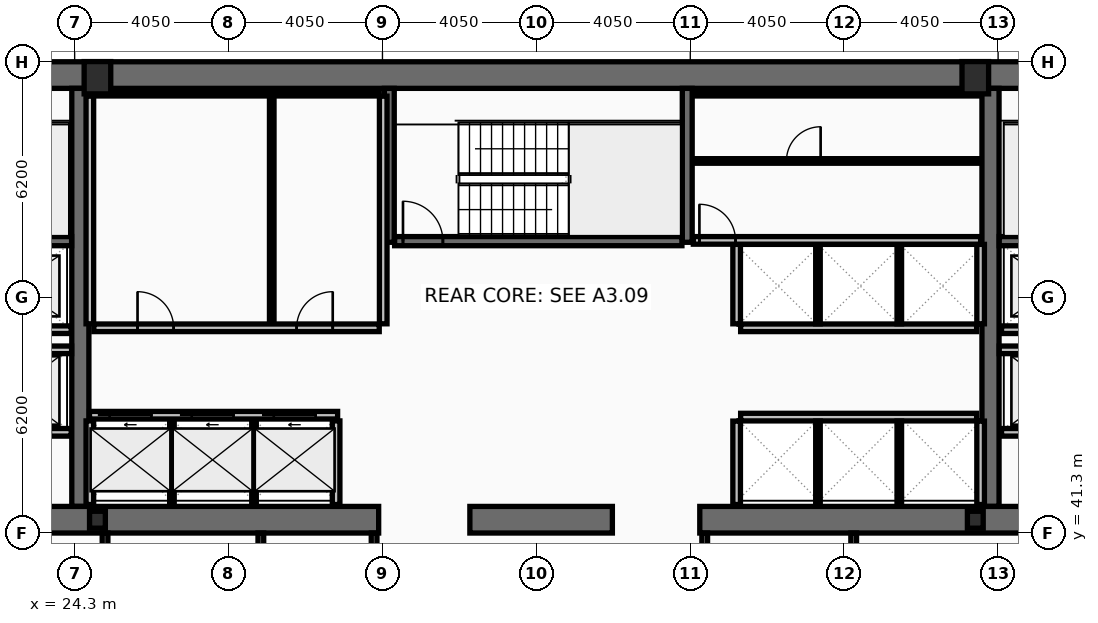
"""IFC4 building model, lengths in metres.
Left out: names, types, materials, properties, quantities, classifications, styles, units other than length and angle.
Written with IfcOpenShell. Run it as: python <this file> out.ifc"""

import sys

from ifc_helpers import new_model, si_unit, direction, frame, frame_2d, origin, origin_2d, place, context, subcontext, project, spatial, rectangle, hollow_rectangle, i_section, extrude, element, fill, save


model = new_model("IFC4")
c1 = context("Model", 3, precision=1e-05, world=origin(), true_north=direction((0.0, 1.0)))
c2 = subcontext(c1, "Body", "Model", "MODEL_VIEW")
j1 = project(units=[si_unit("LENGTHUNIT", "METRE"), si_unit("PLANEANGLEUNIT", "RADIAN")], contexts=[c1])
p1 = place(None, origin())
s1 = spatial("IfcSite", under=j1, at=p1, CompositionType="ELEMENT")
p2 = place(p1, origin())
s2 = spatial("IfcBuilding", under=s1, at=p2, CompositionType="ELEMENT")
p3 = place(p2, frame((0.0, 0.0, 114.6)))
s3 = spatial("IfcBuildingStorey", under=s2, at=p3, CompositionType="ELEMENT", Elevation=114.6)
p4 = place(p3, frame((16.2, 53.35, 0.0), z_axis=(0.0, 0.0, 1.0), x_axis=(1.0, 0.0, 0.0)))
e1 = element("IfcWall", 1, at=p4, inside=s3, PredefinedType="SHEAR", context=c2, shape_type="SweptSolid", body=[
    extrude(rectangle(XDim=40.5, YDim=0.7, at=frame_2d((20.25, 0.0))), origin(), (0.0, 0.0, 1.0), 3.44),
])
for number, where, z_axis, x_axis in (
    (2, (24.45, 42.0, 0.0), (0.0, 0.0, 1.0), (0.0, 1.0, 0.0)),
    (3, (48.4, 42.0, 0.0), (0.0, 0.0, 1.0), (0.0, 1.0, 0.0)),
):
    element("IfcWall", number, at=place(p3, frame(where, z_axis=z_axis, x_axis=x_axis)), inside=s3, PredefinedType="SHEAR", context=c2, shape_type="SweptSolid", body=[
        extrude(rectangle(XDim=11.0, YDim=0.45, at=frame_2d((5.5, 0.0))), origin(), (0.0, 0.0, 1.0), 3.44),
    ])
p5 = place(p3, frame((32.3, 41.65, 0.0), z_axis=(0.0, 0.0, 1.0), x_axis=(-1.0, 0.0, 0.0)))
e4 = element("IfcWall", 4, at=p5, inside=s3, PredefinedType="SHEAR", context=c2, shape_type="SweptSolid", body=[
    extrude(rectangle(XDim=11.45, YDim=0.7, at=frame_2d((5.725, 0.0))), origin(), (0.0, 0.0, 1.0), 3.44),
])
p6 = place(p3, frame((38.45, 41.65, 0.0), z_axis=(0.0, 0.0, 1.0), x_axis=(-1.0, 0.0, 0.0)))
e5 = element("IfcWall", 5, at=p6, inside=s3, PredefinedType="SHEAR", context=c2, shape_type="SweptSolid", body=[
    extrude(rectangle(XDim=3.75, YDim=0.7, at=frame_2d((1.875, 0.0))), origin(), (0.0, 0.0, 1.0), 3.44),
])
p7 = place(p3, frame((52.05, 41.65, 0.0), z_axis=(0.0, 0.0, 1.0), x_axis=(-1.0, 0.0, 0.0)))
e6 = element("IfcWall", 6, at=p7, inside=s3, PredefinedType="SHEAR", context=c2, shape_type="SweptSolid", body=[
    extrude(rectangle(XDim=11.3, YDim=0.7, at=frame_2d((5.65, 0.0))), origin(), (0.0, 0.0, 1.0), 3.44),
])
for number, where, z_axis, x_axis in (
    (7, (32.58, 48.95, 0.0), (0.0, 0.0, 1.0), (0.0, 1.0, 0.0)),
    (8, (40.42, 48.95, 0.0), (0.0, 0.0, 1.0), (0.0, 1.0, 0.0)),
):
    element("IfcWall", number, at=place(p3, frame(where, z_axis=z_axis, x_axis=x_axis)), inside=s3, PredefinedType="SHEAR", context=c2, shape_type="SweptSolid", body=[
        extrude(rectangle(XDim=4.05, YDim=0.26, at=frame_2d((2.025, 0.0))), origin(), (0.0, 0.0, 1.0), 3.44),
    ])
p8 = place(p3, frame((16.9, 48.98, 0.0), z_axis=(0.0, 0.0, 1.0), x_axis=(1.0, 0.0, 0.0)))
e9 = element("IfcWall", 9, at=p8, inside=s3, PredefinedType="SHEAR", context=c2, shape_type="SweptSolid", body=[
    extrude(rectangle(XDim=7.32, YDim=0.24, at=frame_2d((3.66, 0.0))), origin(), (0.0, 0.0, 1.0), 3.44),
])
p9 = place(p8, frame((0.22, 0.0, 0.0)))
e10 = element("IfcOpeningElement", 10, at=p9, cuts=e9, PredefinedType="OPENING", context=c2, shape_type="SweptSolid", body=[
    extrude(rectangle(XDim=1.05, YDim=2.15, at=frame_2d((0.525, 1.075))), frame((0.0, 0.13, 0.0), z_axis=(0.0, -1.0, 0.0), x_axis=(1.0, 0.0, 0.0)), (0.0, 0.0, 1.0), 0.26),
])
p10 = place(p3, frame((48.63, 48.98, 0.0), z_axis=(0.0, 0.0, 1.0), x_axis=(1.0, 0.0, 0.0)))
e11 = element("IfcWall", 11, at=p10, inside=s3, PredefinedType="SHEAR", context=c2, shape_type="SweptSolid", body=[
    extrude(rectangle(XDim=7.37, YDim=0.24, at=frame_2d((3.685, 0.0))), origin(), (0.0, 0.0, 1.0), 3.44),
])
p11 = place(p10, frame((6.1, 0.0, 0.0)))
e12 = element("IfcOpeningElement", 12, at=p11, cuts=e11, PredefinedType="OPENING", context=c2, shape_type="SweptSolid", body=[
    extrude(rectangle(XDim=1.05, YDim=2.15, at=frame_2d((0.525, 1.075))), frame((0.0, 0.13, 0.0), z_axis=(0.0, -1.0, 0.0), x_axis=(1.0, 0.0, 0.0)), (0.0, 0.0, 1.0), 0.26),
])
p12 = place(p3, frame((32.72, 48.98, 0.0), z_axis=(0.0, 0.0, 1.0), x_axis=(1.0, 0.0, 0.0)))
e13 = element("IfcWall", 13, at=p12, inside=s3, PredefinedType="SHEAR", context=c2, shape_type="SweptSolid", body=[
    extrude(rectangle(XDim=7.56, YDim=0.24, at=frame_2d((3.78, 0.0))), origin(), (0.0, 0.0, 1.0), 3.44),
])
p13 = place(p12, frame((0.22, 0.0, 0.0)))
e14 = element("IfcOpeningElement", 14, at=p13, cuts=e13, PredefinedType="OPENING", context=c2, shape_type="SweptSolid", body=[
    extrude(rectangle(XDim=1.05, YDim=2.15, at=frame_2d((0.525, 1.075))), frame((0.0, 0.13, 0.0), z_axis=(0.0, -1.0, 0.0), x_axis=(1.0, 0.0, 0.0)), (0.0, 0.0, 1.0), 0.26),
])
for number, where, z_axis, x_axis in (
    (15, (24.9, 53.28, 0.0), (0.0, 0.0, 1.0), (1.0, 0.0, 0.0)),
    (16, (48.0, 53.28, 0.0), (0.0, 0.0, 1.0), (1.0, 0.0, 0.0)),
):
    element("IfcColumn", number, at=place(p3, frame(where, z_axis=z_axis, x_axis=x_axis)), inside=s3, PredefinedType="COLUMN", context=c2, shape_type="SweptSolid", body=[
        extrude(hollow_rectangle(XDim=0.7, YDim=0.85, WallThickness=0.05, at=origin_2d()), origin(), (0.0, 0.0, 1.0), 3.6),
    ])
for number, where, z_axis, x_axis in (
    (17, (24.9, 41.65, 0.0), (0.0, 0.0, 1.0), (1.0, 0.0, 0.0)),
    (18, (48.0, 41.65, 0.0), (0.0, 0.0, 1.0), (1.0, 0.0, 0.0)),
):
    element("IfcColumn", number, at=place(p3, frame(where, z_axis=z_axis, x_axis=x_axis)), inside=s3, PredefinedType="COLUMN", context=c2, shape_type="SweptSolid", body=[
        extrude(i_section(OverallWidth=0.416, OverallDepth=0.446, WebThickness=0.039, FlangeThickness=0.063, at=origin_2d()), origin(), (0.0, 0.0, 1.0), 3.6),
    ])
p14 = place(p3, frame((24.69, 44.4, 0.0), z_axis=(0.0, 0.0, 1.0), x_axis=(1.0, 0.0, 0.0)))
e19 = element("IfcWall", 19, at=p14, inside=s3, PredefinedType="PARTITIONING", context=c2, shape_type="SweptSolid", body=[
    extrude(rectangle(XDim=6.53, YDim=0.2, at=frame_2d((3.265, 0.0))), origin(), (0.0, 0.0, 1.0), 3.44),
])
p15 = place(p14, frame((0.53, 0.0, 0.0)))
e20 = element("IfcOpeningElement", 20, at=p15, cuts=e19, PredefinedType="OPENING", context=c2, shape_type="SweptSolid", body=[
    extrude(rectangle(XDim=1.1, YDim=2.18, at=frame_2d((0.55, 1.09))), frame((0.0, 0.11, 0.0), z_axis=(0.0, -1.0, 0.0), x_axis=(1.0, 0.0, 0.0)), (0.0, 0.0, 1.0), 0.22),
])
p16 = place(p14, frame((2.69, 0.0, 0.0)))
e21 = element("IfcOpeningElement", 21, at=p16, cuts=e19, PredefinedType="OPENING", context=c2, shape_type="SweptSolid", body=[
    extrude(rectangle(XDim=1.1, YDim=2.18, at=frame_2d((0.55, 1.09))), frame((0.0, 0.11, 0.0), z_axis=(0.0, -1.0, 0.0), x_axis=(1.0, 0.0, 0.0)), (0.0, 0.0, 1.0), 0.22),
])
p17 = place(p14, frame((4.85, 0.0, 0.0)))
e22 = element("IfcOpeningElement", 22, at=p17, cuts=e19, PredefinedType="OPENING", context=c2, shape_type="SweptSolid", body=[
    extrude(rectangle(XDim=1.1, YDim=2.18, at=frame_2d((0.55, 1.09))), frame((0.0, 0.11, 0.0), z_axis=(0.0, -1.0, 0.0), x_axis=(1.0, 0.0, 0.0)), (0.0, 0.0, 1.0), 0.22),
])
p18 = place(p3, frame((51.61, 43.95, 0.0), z_axis=(0.0, 0.0, 1.0), x_axis=(-1.0, 0.0, 0.0)))
e23 = element("IfcWall", 23, at=p18, inside=s3, PredefinedType="PARTITIONING", context=c2, shape_type="SweptSolid", body=[
    extrude(rectangle(XDim=2.92, YDim=0.2, at=frame_2d((1.46, 0.0))), origin(), (0.0, 0.0, 1.0), 3.44),
])
p19 = place(p18, frame((0.81, 0.0, 0.0)))
e24 = element("IfcOpeningElement", 24, at=p19, cuts=e23, PredefinedType="OPENING", context=c2, shape_type="SweptSolid", body=[
    extrude(rectangle(XDim=1.3, YDim=2.18, at=frame_2d((0.65, 1.09))), frame((0.0, 0.11, 0.0), z_axis=(0.0, -1.0, 0.0), x_axis=(1.0, 0.0, 0.0)), (0.0, 0.0, 1.0), 0.22),
])
p20 = place(p3, frame((24.21, 43.95, 0.0), z_axis=(0.0, 0.0, 1.0), x_axis=(-1.0, 0.0, 0.0)))
e25 = element("IfcWall", 25, at=p20, inside=s3, PredefinedType="PARTITIONING", context=c2, shape_type="SweptSolid", body=[
    extrude(rectangle(XDim=2.97, YDim=0.2, at=frame_2d((1.485, 0.0))), origin(), (0.0, 0.0, 1.0), 3.44),
])
p21 = place(p20, frame((0.86, 0.0, 0.0)))
e26 = element("IfcOpeningElement", 26, at=p21, cuts=e25, PredefinedType="OPENING", context=c2, shape_type="SweptSolid", body=[
    extrude(rectangle(XDim=1.3, YDim=2.18, at=frame_2d((0.65, 1.09))), frame((0.0, 0.11, 0.0), z_axis=(0.0, -1.0, 0.0), x_axis=(1.0, 0.0, 0.0)), (0.0, 0.0, 1.0), 0.22),
])
p22 = place(p3, frame((51.61, 46.65, 0.0), z_axis=(0.0, 0.0, 1.0), x_axis=(-1.0, 0.0, 0.0)))
e27 = element("IfcWall", 27, at=p22, inside=s3, PredefinedType="PARTITIONING", context=c2, shape_type="SweptSolid", body=[
    extrude(rectangle(XDim=2.92, YDim=0.2, at=frame_2d((1.46, 0.0))), origin(), (0.0, 0.0, 1.0), 3.44),
])
p23 = place(p22, frame((0.86, 0.0, 0.0)))
e28 = element("IfcOpeningElement", 28, at=p23, cuts=e27, PredefinedType="OPENING", context=c2, shape_type="SweptSolid", body=[
    extrude(rectangle(XDim=1.2, YDim=2.18, at=frame_2d((0.6, 1.09))), frame((0.0, 0.11, 0.0), z_axis=(0.0, -1.0, 0.0), x_axis=(1.0, 0.0, 0.0)), (0.0, 0.0, 1.0), 0.22),
])
p24 = place(p3, frame((24.21, 46.65, 0.0), z_axis=(0.0, 0.0, 1.0), x_axis=(-1.0, 0.0, 0.0)))
e29 = element("IfcWall", 29, at=p24, inside=s3, PredefinedType="PARTITIONING", context=c2, shape_type="SweptSolid", body=[
    extrude(rectangle(XDim=2.97, YDim=0.2, at=frame_2d((1.485, 0.0))), origin(), (0.0, 0.0, 1.0), 3.44),
])
p25 = place(p24, frame((0.91, 0.0, 0.0)))
e30 = element("IfcOpeningElement", 30, at=p25, cuts=e29, PredefinedType="OPENING", context=c2, shape_type="SweptSolid", body=[
    extrude(rectangle(XDim=1.2, YDim=2.18, at=frame_2d((0.6, 1.09))), frame((0.0, 0.11, 0.0), z_axis=(0.0, -1.0, 0.0), x_axis=(1.0, 0.0, 0.0)), (0.0, 0.0, 1.0), 0.22),
])
p26 = place(p3, frame((21.2, 46.12, 0.0), z_axis=(0.0, 0.0, 1.0), x_axis=(1.0, 0.0, 0.0)))
e31 = element("IfcWall", 31, at=p26, inside=s3, PredefinedType="PARTITIONING", context=c2, shape_type="SweptSolid", body=[
    extrude(rectangle(XDim=3.02, YDim=0.2, at=frame_2d((1.51, 0.0))), origin(), (0.0, 0.0, 1.0), 3.44),
])
p27 = place(p3, frame((48.63, 46.12, 0.0), z_axis=(0.0, 0.0, 1.0), x_axis=(1.0, 0.0, 0.0)))
e32 = element("IfcWall", 32, at=p27, inside=s3, PredefinedType="PARTITIONING", context=c2, shape_type="SweptSolid", body=[
    extrude(rectangle(XDim=3.07, YDim=0.2, at=frame_2d((1.535, 0.0))), origin(), (0.0, 0.0, 1.0), 3.44),
])
for number, where, z_axis, x_axis in (
    (33, (24.7, 46.805, 0.0), (0.0, 0.0, 1.0), (0.0, 1.0, 0.0)),
    (34, (32.42, 46.805, 0.0), (0.0, 0.0, 1.0), (0.0, 1.0, 0.0)),
):
    element("IfcWall", number, at=place(p3, frame(where, z_axis=z_axis, x_axis=x_axis)), inside=s3, PredefinedType="PARTITIONING", context=c2, shape_type="SweptSolid", body=[
        extrude(rectangle(XDim=5.99, YDim=0.2, at=frame_2d((2.995, 0.0))), origin(), (0.0, 0.0, 1.0), 3.44),
    ])
p28 = place(p3, frame((24.805, 52.86, 0.0), z_axis=(0.0, 0.0, 1.0), x_axis=(1.0, 0.0, 0.0)))
e35 = element("IfcWall", 35, at=p28, inside=s3, PredefinedType="PARTITIONING", context=c2, shape_type="SweptSolid", body=[
    extrude(rectangle(XDim=7.51, YDim=0.12, at=frame_2d((3.755, 0.0))), origin(), (0.0, 0.0, 1.0), 3.44),
])
p29 = place(p3, frame((29.486, 46.805, 0.0), z_axis=(0.0, 0.0, 1.0), x_axis=(0.0, 1.0, 0.0)))
e36 = element("IfcWall", 36, at=p29, inside=s3, PredefinedType="PARTITIONING", context=c2, shape_type="SweptSolid", body=[
    extrude(rectangle(XDim=5.99, YDim=0.12, at=frame_2d((2.995, 0.0))), origin(), (0.0, 0.0, 1.0), 3.44),
])
p30 = place(p3, frame((24.805, 46.7, 0.0), z_axis=(0.0, 0.0, 1.0), x_axis=(1.0, 0.0, 0.0)))
e37 = element("IfcWall", 37, at=p30, inside=s3, PredefinedType="PARTITIONING", context=c2, shape_type="SweptSolid", body=[
    extrude(rectangle(XDim=7.51, YDim=0.2, at=frame_2d((3.755, 0.0))), origin(), (0.0, 0.0, 1.0), 3.44),
])
p31 = place(p30, frame((1.15, 0.0, 0.0)))
e38 = element("IfcOpeningElement", 38, at=p31, cuts=e37, PredefinedType="OPENING", context=c2, shape_type="SweptSolid", body=[
    extrude(rectangle(XDim=0.95, YDim=2.1, at=frame_2d((0.475, 1.05))), frame((0.0, 0.11, 0.0), z_axis=(0.0, -1.0, 0.0), x_axis=(1.0, 0.0, 0.0)), (0.0, 0.0, 1.0), 0.22),
])
p32 = place(p30, frame((5.336, 0.0, 0.0)))
e39 = element("IfcOpeningElement", 39, at=p32, cuts=e37, PredefinedType="OPENING", context=c2, shape_type="SweptSolid", body=[
    extrude(rectangle(XDim=0.95, YDim=2.1, at=frame_2d((0.475, 1.05))), frame((0.0, 0.11, 0.0), z_axis=(0.0, -1.0, 0.0), x_axis=(1.0, 0.0, 0.0)), (0.0, 0.0, 1.0), 0.22),
])
for number, where, z_axis, x_axis in (
    (40, (24.7, 42.05, 0.0), (0.0, 0.0, 1.0), (0.0, 1.0, 0.0)),
    (41, (31.18, 42.05, 0.0), (0.0, 0.0, 1.0), (0.0, 1.0, 0.0)),
):
    element("IfcWall", number, at=place(p3, frame(where, z_axis=z_axis, x_axis=x_axis)), inside=s3, PredefinedType="PARTITIONING", context=c2, shape_type="SweptSolid", body=[
        extrude(rectangle(XDim=2.2, YDim=0.2, at=frame_2d((1.1, 0.0))), origin(), (0.0, 0.0, 1.0), 3.44),
    ])
for number, where, z_axis, x_axis in (
    (42, (26.86, 42.05, 0.0), (0.0, 0.0, 1.0), (0.0, 1.0, 0.0)),
    (43, (29.02, 42.05, 0.0), (0.0, 0.0, 1.0), (0.0, 1.0, 0.0)),
):
    element("IfcWall", number, at=place(p3, frame(where, z_axis=z_axis, x_axis=x_axis)), inside=s3, PredefinedType="PARTITIONING", context=c2, shape_type="SweptSolid", body=[
        extrude(rectangle(XDim=2.2, YDim=0.12, at=frame_2d((1.1, 0.0))), origin(), (0.0, 0.0, 1.0), 3.44),
    ])
p33 = place(p3, frame((41.825, 46.7, 0.0), z_axis=(0.0, 0.0, 1.0), x_axis=(1.0, 0.0, 0.0)))
e44 = element("IfcWall", 44, at=p33, inside=s3, PredefinedType="PARTITIONING", context=c2, shape_type="SweptSolid", body=[
    extrude(rectangle(XDim=6.21, YDim=0.2, at=frame_2d((3.105, 0.0))), origin(), (0.0, 0.0, 1.0), 3.44),
])
for number, where, z_axis, x_axis in (
    (45, (41.72, 46.805, 0.0), (0.0, 0.0, 1.0), (0.0, 1.0, 0.0)),
    (46, (48.14, 46.805, 0.0), (0.0, 0.0, 1.0), (0.0, 1.0, 0.0)),
):
    element("IfcWall", number, at=place(p3, frame(where, z_axis=z_axis, x_axis=x_axis)), inside=s3, PredefinedType="PARTITIONING", context=c2, shape_type="SweptSolid", body=[
        extrude(rectangle(XDim=2.09, YDim=0.2, at=frame_2d((1.045, 0.0))), origin(), (0.0, 0.0, 1.0), 3.44),
    ])
for number, where, z_axis, x_axis in (
    (47, (43.86, 46.805, 0.0), (0.0, 0.0, 1.0), (0.0, 1.0, 0.0)),
    (48, (46.0, 46.805, 0.0), (0.0, 0.0, 1.0), (0.0, 1.0, 0.0)),
):
    element("IfcWall", number, at=place(p3, frame(where, z_axis=z_axis, x_axis=x_axis)), inside=s3, PredefinedType="PARTITIONING", context=c2, shape_type="SweptSolid", body=[
        extrude(rectangle(XDim=2.09, YDim=0.12, at=frame_2d((1.045, 0.0))), origin(), (0.0, 0.0, 1.0), 3.44),
    ])
p34 = place(p3, frame((41.825, 44.35, 0.0), z_axis=(0.0, 0.0, 1.0), x_axis=(1.0, 0.0, 0.0)))
e49 = element("IfcWall", 49, at=p34, inside=s3, PredefinedType="PARTITIONING", context=c2, shape_type="SweptSolid", body=[
    extrude(rectangle(XDim=6.21, YDim=0.2, at=frame_2d((3.105, 0.0))), origin(), (0.0, 0.0, 1.0), 3.44),
])
for number, where, z_axis, x_axis in (
    (50, (41.72, 42.05, 0.0), (0.0, 0.0, 1.0), (0.0, 1.0, 0.0)),
    (51, (48.14, 42.05, 0.0), (0.0, 0.0, 1.0), (0.0, 1.0, 0.0)),
):
    element("IfcWall", number, at=place(p3, frame(where, z_axis=z_axis, x_axis=x_axis)), inside=s3, PredefinedType="PARTITIONING", context=c2, shape_type="SweptSolid", body=[
        extrude(rectangle(XDim=2.195, YDim=0.2, at=frame_2d((1.098, 0.0))), origin(), (0.0, 0.0, 1.0), 3.44),
    ])
for number, where, z_axis, x_axis in (
    (52, (43.86, 42.05, 0.0), (0.0, 0.0, 1.0), (0.0, 1.0, 0.0)),
    (53, (46.0, 42.05, 0.0), (0.0, 0.0, 1.0), (0.0, 1.0, 0.0)),
):
    element("IfcWall", number, at=place(p3, frame(where, z_axis=z_axis, x_axis=x_axis)), inside=s3, PredefinedType="PARTITIONING", context=c2, shape_type="SweptSolid", body=[
        extrude(rectangle(XDim=2.195, YDim=0.12, at=frame_2d((1.098, 0.0))), origin(), (0.0, 0.0, 1.0), 3.44),
    ])
p35 = place(p3, frame((40.58, 52.86, 0.0), z_axis=(0.0, 0.0, 1.0), x_axis=(1.0, 0.0, 0.0)))
e54 = element("IfcWall", 54, at=p35, inside=s3, PredefinedType="PARTITIONING", context=c2, shape_type="SweptSolid", body=[
    extrude(rectangle(XDim=7.56, YDim=0.12, at=frame_2d((3.78, 0.0))), origin(), (0.0, 0.0, 1.0), 3.44),
])
p36 = place(p3, frame((40.58, 49.0, 0.0), z_axis=(0.0, 0.0, 1.0), x_axis=(1.0, 0.0, 0.0)))
e55 = element("IfcWall", 55, at=p36, inside=s3, PredefinedType="PARTITIONING", context=c2, shape_type="SweptSolid", body=[
    extrude(rectangle(XDim=7.56, YDim=0.2, at=frame_2d((3.78, 0.0))), origin(), (0.0, 0.0, 1.0), 3.44),
])
p37 = place(p36, frame((0.16, 0.0, 0.0)))
e56 = element("IfcOpeningElement", 56, at=p37, cuts=e55, PredefinedType="OPENING", context=c2, shape_type="SweptSolid", body=[
    extrude(rectangle(XDim=0.95, YDim=2.1, at=frame_2d((0.475, 1.05))), frame((0.0, 0.11, 0.0), z_axis=(0.0, -1.0, 0.0), x_axis=(1.0, 0.0, 0.0)), (0.0, 0.0, 1.0), 0.22),
])
p38 = place(p3, frame((40.63, 51.09, 0.0), z_axis=(0.0, 0.0, 1.0), x_axis=(1.0, 0.0, 0.0)))
e57 = element("IfcWall", 57, at=p38, inside=s3, PredefinedType="PARTITIONING", context=c2, shape_type="SweptSolid", body=[
    extrude(rectangle(XDim=7.46, YDim=0.12, at=frame_2d((3.73, 0.0))), origin(), (0.0, 0.0, 1.0), 3.44),
])
p39 = place(p38, frame((2.4, 0.0, 0.0)))
e58 = element("IfcOpeningElement", 58, at=p39, cuts=e57, PredefinedType="OPENING", context=c2, shape_type="SweptSolid", body=[
    extrude(rectangle(XDim=0.9, YDim=2.05, at=frame_2d((0.45, 1.025))), frame((0.0, 0.07, 0.0), z_axis=(0.0, -1.0, 0.0), x_axis=(1.0, 0.0, 0.0)), (0.0, 0.0, 1.0), 0.14),
])
p40 = place(p3, frame((25.1, 38.28, 0.0), z_axis=(0.0, 0.0, 1.0), x_axis=(0.0, 1.0, 0.0)))
e59 = element("IfcWall", 59, at=p40, inside=s3, PredefinedType="PARTITIONING", context=c2, shape_type="SweptSolid", body=[
    extrude(rectangle(XDim=3.02, YDim=0.15, at=frame_2d((1.51, 0.0))), origin(), (0.0, 0.0, 1.0), 2.73),
])
for number, where, z_axis, x_axis in (
    (60, (29.2, 38.28, 0.0), (0.0, 0.0, 1.0), (0.0, 1.0, 0.0)),
    (61, (32.18, 38.28, 0.0), (0.0, 0.0, 1.0), (0.0, 1.0, 0.0)),
    (62, (40.88, 38.28, 0.0), (0.0, 0.0, 1.0), (0.0, 1.0, 0.0)),
    (63, (44.8, 38.28, 0.0), (0.0, 0.0, 1.0), (0.0, 1.0, 0.0)),
):
    element("IfcWall", number, at=place(p3, frame(where, z_axis=z_axis, x_axis=x_axis)), inside=s3, PredefinedType="PARTITIONING", context=c2, shape_type="SweptSolid", body=[
        extrude(rectangle(XDim=3.02, YDim=0.15, at=frame_2d((1.51, 0.0))), origin(), (0.0, 0.0, 1.0), 3.44),
    ])
p41 = place(p13, origin())
e64 = element("IfcDoor", 64, at=p41, inside=s3, OperationType="SINGLE_SWING_LEFT", PredefinedType="DOOR", context=c2, shape_type="SweptSolid", body=[
    extrude(rectangle(XDim=1.05, YDim=2.15, at=frame_2d((0.525, 1.075))), frame((0.0, 0.025, 0.0), z_axis=(0.0, -1.0, 0.0), x_axis=(1.0, 0.0, 0.0)), (0.0, 0.0, 1.0), 0.05),
])
fill(e14, e64)
p42 = place(p15, origin())
e65 = element("IfcDoor", 65, at=p42, inside=s3, OperationType="SLIDING_TO_LEFT", PredefinedType="DOOR", context=c2, shape_type="SweptSolid", body=[
    extrude(rectangle(XDim=1.1, YDim=2.18, at=frame_2d((0.55, 1.09))), frame((0.0, 0.025, 0.0), z_axis=(0.0, -1.0, 0.0), x_axis=(1.0, 0.0, 0.0)), (0.0, 0.0, 1.0), 0.05),
])
fill(e20, e65)
p43 = place(p16, origin())
e66 = element("IfcDoor", 66, at=p43, inside=s3, OperationType="SLIDING_TO_LEFT", PredefinedType="DOOR", context=c2, shape_type="SweptSolid", body=[
    extrude(rectangle(XDim=1.1, YDim=2.18, at=frame_2d((0.55, 1.09))), frame((0.0, 0.025, 0.0), z_axis=(0.0, -1.0, 0.0), x_axis=(1.0, 0.0, 0.0)), (0.0, 0.0, 1.0), 0.05),
])
fill(e21, e66)
p44 = place(p17, origin())
e67 = element("IfcDoor", 67, at=p44, inside=s3, OperationType="SLIDING_TO_LEFT", PredefinedType="DOOR", context=c2, shape_type="SweptSolid", body=[
    extrude(rectangle(XDim=1.1, YDim=2.18, at=frame_2d((0.55, 1.09))), frame((0.0, 0.025, 0.0), z_axis=(0.0, -1.0, 0.0), x_axis=(1.0, 0.0, 0.0)), (0.0, 0.0, 1.0), 0.05),
])
fill(e22, e67)
p45 = place(p31, origin())
e68 = element("IfcDoor", 68, at=p45, inside=s3, OperationType="SINGLE_SWING_LEFT", PredefinedType="DOOR", context=c2, shape_type="SweptSolid", body=[
    extrude(rectangle(XDim=0.95, YDim=2.1, at=frame_2d((0.475, 1.05))), frame((0.0, 0.025, 0.0), z_axis=(0.0, -1.0, 0.0), x_axis=(1.0, 0.0, 0.0)), (0.0, 0.0, 1.0), 0.05),
])
fill(e38, e68)
p46 = place(p32, origin())
e69 = element("IfcDoor", 69, at=p46, inside=s3, OperationType="SINGLE_SWING_RIGHT", PredefinedType="DOOR", context=c2, shape_type="SweptSolid", body=[
    extrude(rectangle(XDim=0.95, YDim=2.1, at=frame_2d((0.475, 1.05))), frame((0.0, 0.025, 0.0), z_axis=(0.0, -1.0, 0.0), x_axis=(1.0, 0.0, 0.0)), (0.0, 0.0, 1.0), 0.05),
])
fill(e39, e69)
p47 = place(p37, origin())
e70 = element("IfcDoor", 70, at=p47, inside=s3, OperationType="SINGLE_SWING_LEFT", PredefinedType="DOOR", context=c2, shape_type="SweptSolid", body=[
    extrude(rectangle(XDim=0.95, YDim=2.1, at=frame_2d((0.475, 1.05))), frame((0.0, 0.025, 0.0), z_axis=(0.0, -1.0, 0.0), x_axis=(1.0, 0.0, 0.0)), (0.0, 0.0, 1.0), 0.05),
])
fill(e56, e70)
p48 = place(p39, origin())
e71 = element("IfcDoor", 71, at=p48, inside=s3, OperationType="SINGLE_SWING_RIGHT", PredefinedType="DOOR", context=c2, shape_type="SweptSolid", body=[
    extrude(rectangle(XDim=0.9, YDim=2.05, at=frame_2d((0.45, 1.025))), frame((0.0, 0.025, 0.0), z_axis=(0.0, -1.0, 0.0), x_axis=(1.0, 0.0, 0.0)), (0.0, 0.0, 1.0), 0.05),
])
fill(e58, e71)
save(model, sys.argv[1])
